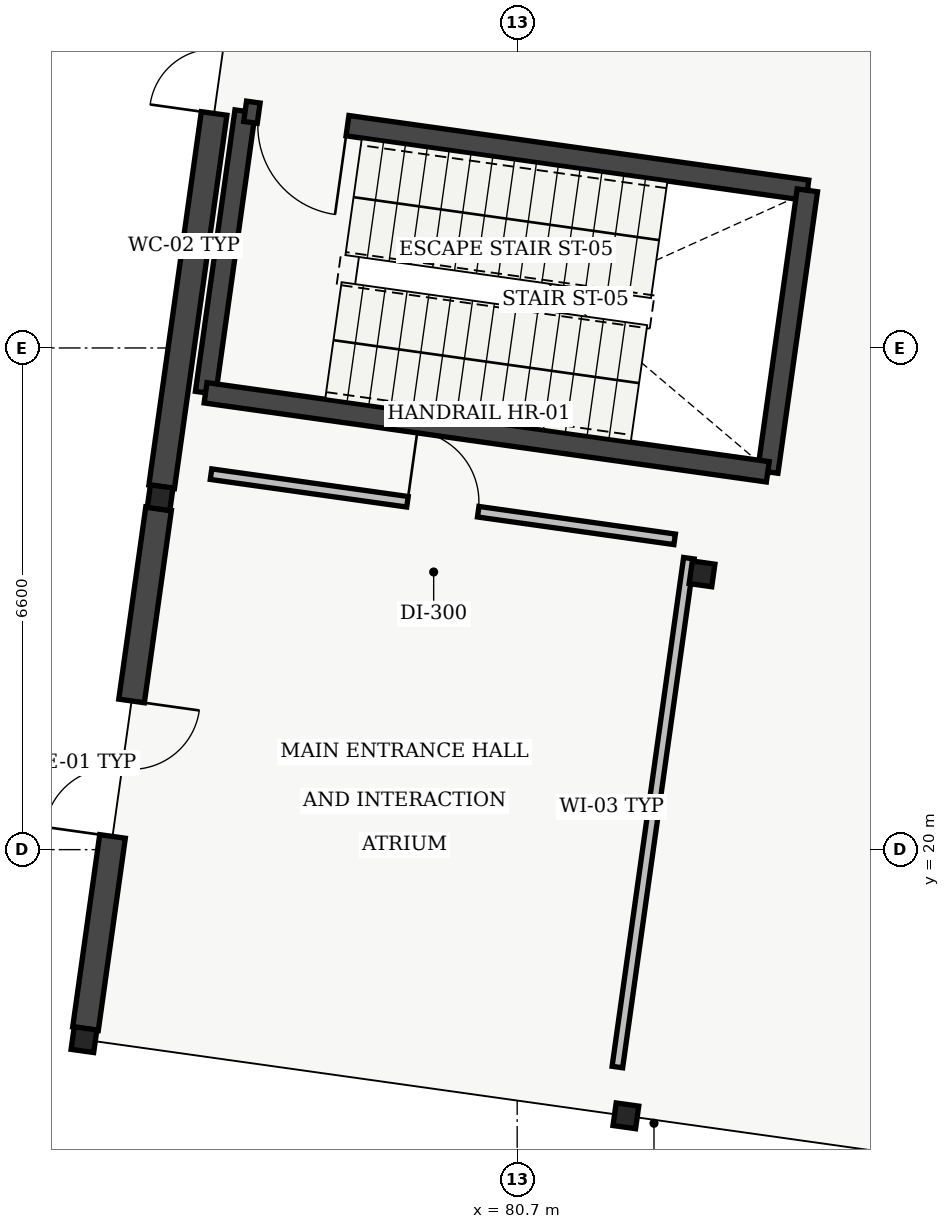
"""IFC4 building model, lengths in metres.
Left out: names, types, materials, properties, quantities, classifications, styles, units other than length and angle.
Written with IfcOpenShell. Run it as: python <this file> out.ifc"""

import sys

from ifc_helpers import new_model, si_unit, direction, frame, frame_2d, origin, origin_2d, place, context, subcontext, project, spatial, rectangle, i_section, extrude, element, fill, save


model = new_model("IFC4")
c1 = context("Model", 3, precision=1e-05, world=origin(), true_north=direction((0.0, 1.0)))
c2 = subcontext(c1, "Body", "Model", "MODEL_VIEW")
j1 = project(units=[si_unit("LENGTHUNIT", "METRE"), si_unit("PLANEANGLEUNIT", "RADIAN")], contexts=[c1])
p1 = place(None, origin())
s1 = spatial("IfcSite", under=j1, at=p1, CompositionType="ELEMENT")
p2 = place(p1, origin())
s2 = spatial("IfcBuilding", under=s1, at=p2, CompositionType="ELEMENT")
p3 = place(p2, origin())
s3 = spatial("IfcBuildingStorey", under=s2, at=p3, CompositionType="ELEMENT", Elevation=0.0)
for number, where, z_axis, x_axis in (
    (1, (75.0, 17.5, 0.0), (0.0, 0.0, 1.0), (0.99, -0.139, 0.0)),
    (2, (76.002, 24.63, 0.0), (0.0, 0.0, 1.0), (0.99, -0.139, 0.0)),
    (3, (82.13, 16.498, 0.0), (0.0, 0.0, 1.0), (0.99, -0.139, 0.0)),
    (4, (83.132, 23.628, 0.0), (0.0, 0.0, 1.0), (0.99, -0.139, 0.0)),
):
    element("IfcColumn", number, at=place(p3, frame(where, z_axis=z_axis, x_axis=x_axis)), inside=s3, PredefinedType="COLUMN", context=c2, shape_type="SweptSolid", body=[
        extrude(i_section(OverallWidth=0.3, OverallDepth=0.3, WebThickness=0.011, FlangeThickness=0.019, at=origin_2d()), origin(), (0.0, 0.0, 1.0), 4.92),
    ])
p4 = place(p3, frame((75.02, 17.644, 0.0), z_axis=(0.0, 0.0, 1.0), x_axis=(0.139170380644, 0.990268451053, 0.0)))
e5 = element("IfcWall", 5, at=p4, inside=s3, PredefinedType="SOLIDWALL", context=c2, shape_type="SweptSolid", body=[
    extrude(rectangle(XDim=6.91, YDim=0.34, at=frame_2d((3.455, 0.0))), origin(), (0.0, 0.0, 1.0), 4.705),
])
p5 = place(p4, frame((2.555, 0.0, 0.0)))
e6 = element("IfcOpeningElement", 6, at=p5, cuts=e5, PredefinedType="OPENING", context=c2, shape_type="SweptSolid", body=[
    extrude(rectangle(XDim=1.8, YDim=2.25, at=frame_2d((0.9, 1.125))), frame((0.0, 0.17, 0.0), z_axis=(0.0, -1.0, 0.0), x_axis=(1.0, 0.0, 0.0)), (0.0, 0.0, 1.0), 0.34),
])
p6 = place(p3, frame((76.022, 24.773, 0.0), z_axis=(0.0, 0.0, 1.0), x_axis=(0.139170380644, 0.990268451053, 0.0)))
e7 = element("IfcWall", 7, at=p6, inside=s3, PredefinedType="SOLIDWALL", context=c2, shape_type="SweptSolid", body=[
    extrude(rectangle(XDim=6.91, YDim=0.34, at=frame_2d((3.455, 0.0))), origin(), (0.0, 0.0, 1.0), 4.705),
])
p7 = place(p6, frame((4.96, 0.0, 0.0)))
e8 = element("IfcOpeningElement", 8, at=p7, cuts=e7, PredefinedType="OPENING", context=c2, shape_type="SweptSolid", body=[
    extrude(rectangle(XDim=1.7, YDim=2.2, at=frame_2d((0.85, 1.1))), frame((0.0, 0.17, 0.0), z_axis=(0.0, -1.0, 0.0), x_axis=(1.0, 0.0, 0.0)), (0.0, 0.0, 1.0), 0.34),
])
p8 = place(p3, frame((76.6, 26.01, 0.0), z_axis=(0.0, 0.0, 1.0), x_axis=(0.139172815303, 0.990268108888, 0.0)))
e9 = element("IfcWall", 9, at=p8, inside=s3, PredefinedType="SHEAR", context=c2, shape_type="SweptSolid", body=[
    extrude(rectangle(XDim=3.74, YDim=0.27, at=frame_2d((1.87, 0.0))), origin(), (0.0, 0.0, 1.0), 4.88),
])
p9 = place(p3, frame((77.12, 29.714, 0.0), z_axis=(0.0, 0.0, 1.0), x_axis=(0.990265308789, -0.139192737628, 0.0)))
e10 = element("IfcWall", 10, at=p9, inside=s3, PredefinedType="SHEAR", context=c2, shape_type="SweptSolid", body=[
    extrude(rectangle(XDim=7.47, YDim=0.27, at=frame_2d((3.735, 0.0))), origin(), (0.0, 0.0, 1.0), 4.88),
])
p10 = place(p9, frame((0.18, 0.0, 0.0)))
e11 = element("IfcOpeningElement", 11, at=p10, cuts=e10, PredefinedType="OPENING", context=c2, shape_type="SweptSolid", body=[
    extrude(rectangle(XDim=1.18, YDim=2.15, at=frame_2d((0.59, 1.075))), frame((0.0, 0.135, 0.0), z_axis=(0.0, -1.0, 0.0), x_axis=(1.0, 0.0, 0.0)), (0.0, 0.0, 1.0), 0.27),
])
p11 = place(p3, frame((84.518, 28.674, 0.0), z_axis=(0.0, 0.0, 1.0), x_axis=(-0.139172815303, -0.990268108888, 0.0)))
e12 = element("IfcWall", 12, at=p11, inside=s3, PredefinedType="SHEAR", context=c2, shape_type="SweptSolid", body=[
    extrude(rectangle(XDim=3.74, YDim=0.27, at=frame_2d((1.87, 0.0))), origin(), (0.0, 0.0, 1.0), 4.88),
])
p12 = place(p3, frame((83.997, 24.97, 0.0), z_axis=(0.0, 0.0, 1.0), x_axis=(-0.990265308789, 0.139192737628, 0.0)))
e13 = element("IfcWall", 13, at=p12, inside=s3, PredefinedType="SHEAR", context=c2, shape_type="SweptSolid", body=[
    extrude(rectangle(XDim=7.47, YDim=0.27, at=frame_2d((3.735, 0.0))), origin(), (0.0, 0.0, 1.0), 4.88),
])
p13 = place(p3, frame((82.018, 17.14, 0.0), z_axis=(0.0, 0.0, 1.0), x_axis=(0.139186215649, 0.990266225504, 0.0)))
e14 = element("IfcWall", 14, at=p13, inside=s3, PredefinedType="PARTITIONING", context=c2, shape_type="SweptSolid", body=[
    extrude(rectangle(XDim=6.76, YDim=0.14, at=frame_2d((3.38, 0.0))), origin(), (0.0, 0.0, 1.0), 4.55),
])
p14 = place(p3, frame((82.772, 24.083, 0.0), z_axis=(0.0, 0.0, 1.0), x_axis=(-0.990271090706, 0.139151596873, 0.0)))
e15 = element("IfcWall", 15, at=p14, inside=s3, PredefinedType="PARTITIONING", context=c2, shape_type="SweptSolid", body=[
    extrude(rectangle(XDim=6.16, YDim=0.14, at=frame_2d((3.08, 0.0))), origin(), (0.0, 0.0, 1.0), 4.55),
])
p15 = place(p14, frame((2.61, 0.0, 0.0)))
e16 = element("IfcOpeningElement", 16, at=p15, cuts=e15, PredefinedType="OPENING", context=c2, shape_type="SweptSolid", body=[
    extrude(rectangle(XDim=0.94, YDim=2.12, at=frame_2d((0.47, 1.06))), frame((0.0, 0.07, 0.0), z_axis=(0.0, -1.0, 0.0), x_axis=(1.0, 0.0, 0.0)), (0.0, 0.0, 1.0), 0.14),
])
p16 = place(p5, origin())
e17 = element("IfcDoor", 17, at=p16, inside=s3, OperationType="DOUBLE_DOOR_SINGLE_SWING", PredefinedType="DOOR", context=c2, shape_type="SweptSolid", body=[
    extrude(rectangle(XDim=1.8, YDim=2.25, at=frame_2d((0.9, 1.125))), frame((0.0, 0.025, 0.0), z_axis=(0.0, -1.0, 0.0), x_axis=(1.0, 0.0, 0.0)), (0.0, 0.0, 1.0), 0.05),
])
fill(e6, e17)
p17 = place(p7, origin())
e18 = element("IfcDoor", 18, at=p17, inside=s3, OperationType="DOUBLE_DOOR_SINGLE_SWING", PredefinedType="DOOR", context=c2, shape_type="SweptSolid", body=[
    extrude(rectangle(XDim=1.7, YDim=2.2, at=frame_2d((0.85, 1.1))), frame((0.0, 0.025, 0.0), z_axis=(0.0, -1.0, 0.0), x_axis=(1.0, 0.0, 0.0)), (0.0, 0.0, 1.0), 0.05),
])
fill(e8, e18)
p18 = place(p10, origin())
e19 = element("IfcDoor", 19, at=p18, inside=s3, OperationType="SINGLE_SWING_RIGHT", PredefinedType="DOOR", context=c2, shape_type="SweptSolid", body=[
    extrude(rectangle(XDim=1.18, YDim=2.15, at=frame_2d((0.59, 1.075))), frame((0.0, 0.025, 0.0), z_axis=(0.0, -1.0, 0.0), x_axis=(1.0, 0.0, 0.0)), (0.0, 0.0, 1.0), 0.05),
])
fill(e11, e19)
p19 = place(p15, origin())
e20 = element("IfcDoor", 20, at=p19, inside=s3, OperationType="SINGLE_SWING_RIGHT", PredefinedType="DOOR", context=c2, shape_type="SweptSolid", body=[
    extrude(rectangle(XDim=0.94, YDim=2.12, at=frame_2d((0.47, 1.06))), frame((0.0, 0.025, 0.0), z_axis=(0.0, -1.0, 0.0), x_axis=(1.0, 0.0, 0.0)), (0.0, 0.0, 1.0), 0.05),
])
fill(e16, e20)
save(model, sys.argv[1])
